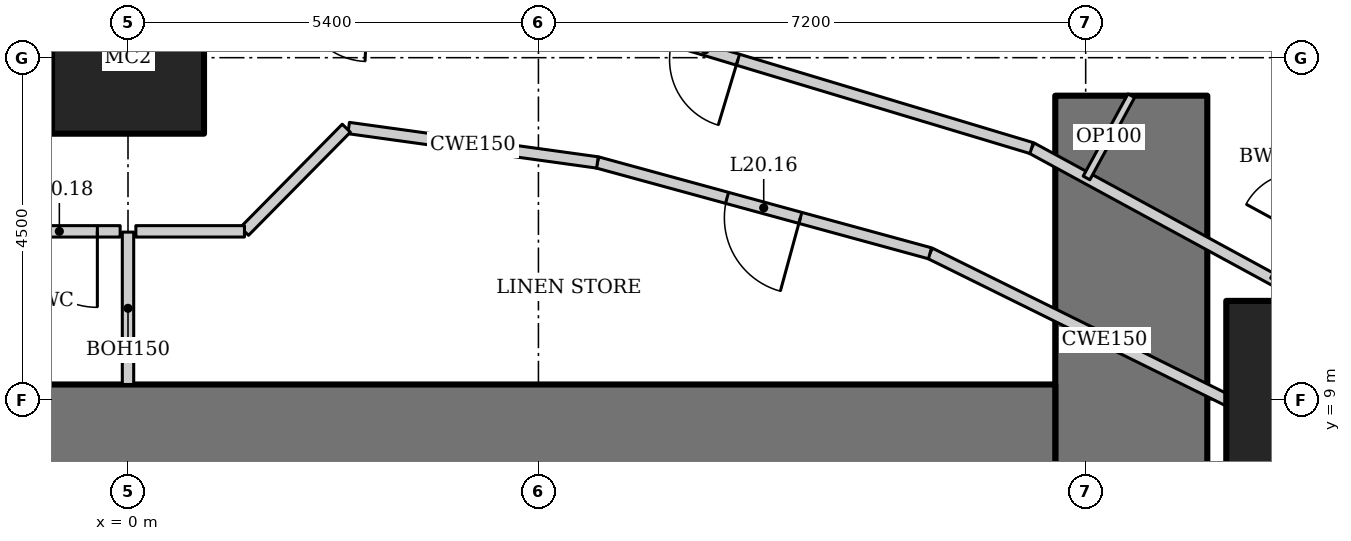
"""IFC4 building model, lengths in metres.
Left out: names, types, materials, properties, quantities, classifications, styles, units other than length and angle.
Written with IfcOpenShell. Run it as: python <this file> out.ifc"""

import sys

from ifc_helpers import new_model, si_unit, direction, frame, frame_2d, origin, origin_2d, place, context, subcontext, project, spatial, rectangle, hollow_rectangle, extrude, element, fill, save


model = new_model("IFC4")
c1 = context("Model", 3, precision=1e-05, world=origin(), true_north=direction((0.0, 1.0)))
c2 = subcontext(c1, "Body", "Model", "MODEL_VIEW")
j1 = project(units=[si_unit("LENGTHUNIT", "METRE"), si_unit("PLANEANGLEUNIT", "RADIAN")], contexts=[c1])
p1 = place(None, origin())
s1 = spatial("IfcSite", under=j1, at=p1, CompositionType="ELEMENT")
p2 = place(p1, origin())
s2 = spatial("IfcBuilding", under=s1, at=p2, CompositionType="ELEMENT")
p3 = place(p2, frame((0.0, 0.0, 87.4)))
s3 = spatial("IfcBuildingStorey", under=s2, at=p3, CompositionType="ELEMENT", Elevation=87.4)
p4 = place(p3, frame((15.75, 9.0, 0.0), z_axis=(0.0, 0.0, 1.0), x_axis=(1.0, 0.0, 0.0)))
e1 = element("IfcColumn", 1, at=p4, inside=s3, PredefinedType="COLUMN", context=c2, shape_type="SweptSolid", body=[
    extrude(hollow_rectangle(XDim=2.6, YDim=2.6, WallThickness=0.13, at=origin_2d()), origin(), (0.0, 0.0, 1.0), 3.6),
])
p5 = place(p3, frame((0.0, 13.5, 0.0), z_axis=(0.0, 0.0, 1.0), x_axis=(1.0, 0.0, 0.0)))
e2 = element("IfcColumn", 2, at=p5, inside=s3, PredefinedType="COLUMN", context=c2, shape_type="SweptSolid", body=[
    extrude(hollow_rectangle(XDim=2.0, YDim=2.0, WallThickness=0.17, at=origin_2d()), origin(), (0.0, 0.0, 1.0), 3.6),
])
p6 = place(p3, frame((13.2, -13.0, 0.0), z_axis=(0.0, 0.0, 1.0), x_axis=(0.0, 1.0, 0.0)))
e3 = element("IfcWall", 3, at=p6, inside=s3, PredefinedType="SHEAR", context=c2, shape_type="SweptSolid", body=[
    extrude(rectangle(XDim=26.0, YDim=2.0, at=frame_2d((13.0, 0.0))), origin(), (0.0, 0.0, 1.0), 3.6),
])
p7 = place(p6, frame((12.1, 0.0, 0.0)))
e4 = element("IfcOpeningElement", 4, at=p7, cuts=e3, PredefinedType="OPENING", context=c2, shape_type="SweptSolid", body=[
    extrude(rectangle(XDim=1.8, YDim=2.1, at=frame_2d((0.9, 1.05))), frame((0.0, 1.01, 0.0), z_axis=(0.0, -1.0, 0.0), x_axis=(1.0, 0.0, 0.0)), (0.0, 0.0, 1.0), 2.02),
])
p8 = place(p3, frame((12.2, 8.0, 0.0), z_axis=(0.0, 0.0, 1.0), x_axis=(-1.0, 0.0, 0.0)))
e5 = element("IfcWall", 5, at=p8, inside=s3, PredefinedType="SHEAR", context=c2, shape_type="SweptSolid", body=[
    extrude(rectangle(XDim=24.4, YDim=2.4, at=frame_2d((12.2, 0.0))), origin(), (0.0, 0.0, 1.0), 3.6),
])
p9 = place(p3, frame((16.835, 9.62, 0.0), z_axis=(0.0, 0.0, 1.0), x_axis=(-0.878450059298, 0.477834169267, 0.0)))
e6 = element("IfcWall", 6, at=p9, inside=s3, PredefinedType="PARTITIONING", context=c2, shape_type="SweptSolid", body=[
    extrude(rectangle(XDim=5.631, YDim=0.15, at=frame_2d((2.815, 0.0))), origin(), (0.0, 0.0, 1.0), 3.45),
])
p10 = place(p3, frame((11.888, 12.311, 0.0), z_axis=(0.0, 0.0, 1.0), x_axis=(-0.957564241242, 0.288219922793, 0.0)))
e7 = element("IfcWall", 7, at=p10, inside=s3, PredefinedType="PARTITIONING", context=c2, shape_type="SweptSolid", body=[
    extrude(rectangle(XDim=5.085, YDim=0.15, at=frame_2d((2.542, 0.0))), origin(), (0.0, 0.0, 1.0), 3.45),
])
p11 = place(p10, frame((4.035, 0.0, 0.0)))
e8 = element("IfcOpeningElement", 8, at=p11, cuts=e7, PredefinedType="OPENING", context=c2, shape_type="SweptSolid", body=[
    extrude(rectangle(XDim=0.9, YDim=2.1, at=frame_2d((0.45, 1.05))), frame((0.0, 0.085, 0.0), z_axis=(0.0, -1.0, 0.0), x_axis=(1.0, 0.0, 0.0)), (0.0, 0.0, 1.0), 0.17),
])
p12 = place(p3, frame((15.147, 8.656, 0.0), z_axis=(0.0, 0.0, 1.0), x_axis=(-0.89656943448, 0.442903205177, 0.0)))
e9 = element("IfcWall", 9, at=p12, inside=s3, PredefinedType="PARTITIONING", context=c2, shape_type="SweptSolid", body=[
    extrude(rectangle(XDim=5.126, YDim=0.15, at=frame_2d((2.563, 0.0))), origin(), (0.0, 0.0, 1.0), 3.45),
])
p13 = place(p3, frame((10.551, 10.926, 0.0), z_axis=(0.0, 0.0, 1.0), x_axis=(-0.964644466646, 0.263554648923, 0.0)))
e10 = element("IfcWall", 10, at=p13, inside=s3, PredefinedType="PARTITIONING", context=c2, shape_type="SweptSolid", body=[
    extrude(rectangle(XDim=4.535, YDim=0.15, at=frame_2d((2.268, 0.0))), origin(), (0.0, 0.0, 1.0), 3.45),
])
p14 = place(p13, frame((1.768, 0.0, 0.0)))
e11 = element("IfcOpeningElement", 11, at=p14, cuts=e10, PredefinedType="OPENING", context=c2, shape_type="SweptSolid", body=[
    extrude(rectangle(XDim=1.0, YDim=2.1, at=frame_2d((0.5, 1.05))), frame((0.0, 0.085, 0.0), z_axis=(0.0, -1.0, 0.0), x_axis=(1.0, 0.0, 0.0)), (0.0, 0.0, 1.0), 0.17),
])
p15 = place(p3, frame((6.176, 12.122, 0.0), z_axis=(0.0, 0.0, 1.0), x_axis=(-0.990563451353, 0.137054911782, 0.0)))
e12 = element("IfcWall", 12, at=p15, inside=s3, PredefinedType="PARTITIONING", context=c2, shape_type="SweptSolid", body=[
    extrude(rectangle(XDim=3.304, YDim=0.15, at=frame_2d((1.652, 0.0))), origin(), (0.0, 0.0, 1.0), 3.45),
])
p16 = place(p3, frame((15.078, 10.576, 0.0), z_axis=(0.0, 0.0, 1.0), x_axis=(0.477832549678, 0.878450940274, 0.0)))
e13 = element("IfcWall", 13, at=p16, inside=s3, PredefinedType="PARTITIONING", context=c2, shape_type="SweptSolid", body=[
    extrude(rectangle(XDim=2.4, YDim=0.1, at=frame_2d((1.2, 0.0))), origin(), (0.0, 0.0, 1.0), 3.45),
])
p17 = place(p16, frame((0.7, 0.0, 0.0)))
e14 = element("IfcOpeningElement", 14, at=p17, cuts=e13, PredefinedType="OPENING", context=c2, shape_type="SweptSolid", body=[
    extrude(rectangle(XDim=0.8, YDim=2.1, at=frame_2d((0.4, 1.05))), frame((0.0, 0.06, 0.0), z_axis=(0.0, -1.0, 0.0), x_axis=(1.0, 0.0, 0.0)), (0.0, 0.0, 1.0), 0.12),
])
p18 = place(p3, frame((13.2, 13.0, 0.0), z_axis=(0.0, 0.0, 1.0), x_axis=(-0.477852414256, -0.878440134665, 0.0)))
e15 = element("IfcWall", 15, at=p18, inside=s3, PredefinedType="PARTITIONING", context=c2, shape_type="SweptSolid", body=[
    extrude(rectangle(XDim=1.232, YDim=0.1, at=frame_2d((0.616, 0.0))), origin(), (0.0, 0.0, 1.0), 3.45),
])
p19 = place(p3, frame((0.0, 9.2, 0.0), z_axis=(0.0, 0.0, 1.0), x_axis=(0.0, 1.0, 0.0)))
e16 = element("IfcWall", 16, at=p19, inside=s3, PredefinedType="PARTITIONING", context=c2, shape_type="SweptSolid", body=[
    extrude(rectangle(XDim=2.005, YDim=0.15, at=frame_2d((1.002, 0.0))), origin(), (0.0, 0.0, 1.0), 3.044),
])
p20 = place(p3, frame((2.873, 12.572, 0.0), z_axis=(0.0, 0.0, 1.0), x_axis=(-0.702677261973, -0.711508724828, 0.0)))
e17 = element("IfcWall", 17, at=p20, inside=s3, PredefinedType="PARTITIONING", context=c2, shape_type="SweptSolid", body=[
    extrude(rectangle(XDim=1.907, YDim=0.15, at=frame_2d((0.954, 0.0))), origin(), (0.0, 0.0, 1.0), 3.45),
])
p21 = place(p3, frame((1.532, 11.215, 0.0), z_axis=(0.0, 0.0, 1.0), x_axis=(-1.0, 0.0, 0.0)))
e18 = element("IfcWall", 18, at=p21, inside=s3, PredefinedType="PARTITIONING", context=c2, shape_type="SweptSolid", body=[
    extrude(rectangle(XDim=1.429, YDim=0.15, at=frame_2d((0.714, 0.0))), origin(), (0.0, 0.0, 1.0), 3.45),
])
p22 = place(p3, frame((-0.103, 11.215, 0.0), z_axis=(0.0, 0.0, 1.0), x_axis=(-1.0, 0.0, 0.0)))
e19 = element("IfcWall", 19, at=p22, inside=s3, PredefinedType="PARTITIONING", context=c2, shape_type="SweptSolid", body=[
    extrude(rectangle(XDim=1.429, YDim=0.15, at=frame_2d((0.714, 0.0))), origin(), (0.0, 0.0, 1.0), 3.45),
])
p23 = place(p22, frame((0.3, 0.0, 0.0)))
e20 = element("IfcOpeningElement", 20, at=p23, cuts=e19, PredefinedType="OPENING", context=c2, shape_type="SweptSolid", body=[
    extrude(rectangle(XDim=1.0, YDim=2.1, at=frame_2d((0.5, 1.05))), frame((0.0, 0.085, 0.0), z_axis=(0.0, -1.0, 0.0), x_axis=(1.0, 0.0, 0.0)), (0.0, 0.0, 1.0), 0.17),
])
p24 = place(p14, origin())
e21 = element("IfcDoor", 21, at=p24, inside=s3, OperationType="SINGLE_SWING_LEFT", PredefinedType="DOOR", context=c2, shape_type="SweptSolid", body=[
    extrude(rectangle(XDim=1.0, YDim=2.1, at=frame_2d((0.5, 1.05))), frame((0.0, 0.025, 0.0), z_axis=(0.0, -1.0, 0.0), x_axis=(1.0, 0.0, 0.0)), (0.0, 0.0, 1.0), 0.05),
])
fill(e11, e21)
p25 = place(p23, origin())
e22 = element("IfcDoor", 22, at=p25, inside=s3, OperationType="SINGLE_SWING_LEFT", PredefinedType="DOOR", context=c2, shape_type="SweptSolid", body=[
    extrude(rectangle(XDim=1.0, YDim=2.1, at=frame_2d((0.5, 1.05))), frame((0.0, 0.025, 0.0), z_axis=(0.0, -1.0, 0.0), x_axis=(1.0, 0.0, 0.0)), (0.0, 0.0, 1.0), 0.05),
])
fill(e20, e22)
p26 = place(p11, origin())
e23 = element("IfcDoor", 23, at=p26, inside=s3, OperationType="SINGLE_SWING_LEFT", PredefinedType="DOOR", context=c2, shape_type="SweptSolid", body=[
    extrude(rectangle(XDim=0.9, YDim=2.1, at=frame_2d((0.45, 1.05))), frame((0.0, 0.025, 0.0), z_axis=(0.0, -1.0, 0.0), x_axis=(1.0, 0.0, 0.0)), (0.0, 0.0, 1.0), 0.05),
])
fill(e8, e23)
save(model, sys.argv[1])
